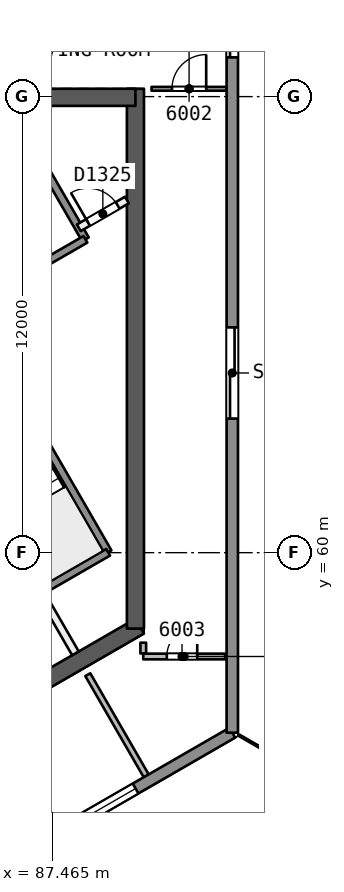
"""IFC4 building model, lengths in metres.
Left out: names, types, materials, properties, quantities, classifications, styles, units other than length and angle.
Written with IfcOpenShell. Run it as: python <this file> out.ifc"""

import sys

from ifc_helpers import new_model, si_unit, direction, frame, frame_2d, origin, origin_2d, place, context, subcontext, project, spatial, rectangle, extrude, element, fill, save


model = new_model("IFC4")
c1 = context("Model", 3, precision=1e-05, world=origin(), true_north=direction((0.0, 1.0)))
c2 = subcontext(c1, "Body", "Model", "MODEL_VIEW")
j1 = project(units=[si_unit("LENGTHUNIT", "METRE"), si_unit("PLANEANGLEUNIT", "RADIAN")], contexts=[c1])
p1 = place(None, origin())
s1 = spatial("IfcSite", under=j1, at=p1, CompositionType="ELEMENT")
p2 = place(p1, origin())
s2 = spatial("IfcBuilding", under=s1, at=p2, CompositionType="ELEMENT")
p3 = place(p2, frame((0.0, 0.0, 242.8)))
s3 = spatial("IfcBuildingStorey", under=s2, at=p3, CompositionType="ELEMENT", Elevation=242.8)
p4 = place(p3, frame((86.723, 56.31, 0.0), z_axis=(0.0, 0.0, 1.0), x_axis=(0.866042179588, 0.49997094233, 0.0)))
e1 = element("IfcWall", 1, at=p4, inside=s3, PredefinedType="SHEAR", context=c2, shape_type="SweptSolid", body=[
    extrude(rectangle(XDim=3.515, YDim=0.45, at=frame_2d((1.758, 0.0))), origin(), (0.0, 0.0, 1.0), 3.7),
])
p5 = place(p3, frame((89.655, 58.002, 0.0), z_axis=(0.0, 0.0, 1.0), x_axis=(0.0, 1.0, 0.0)))
e2 = element("IfcWall", 2, at=p5, inside=s3, PredefinedType="SHEAR", context=c2, shape_type="SweptSolid", body=[
    extrude(rectangle(XDim=14.204, YDim=0.45, at=frame_2d((7.102, 0.0))), origin(), (0.0, 0.0, 1.0), 3.7),
])
p6 = place(p3, frame((89.655, 71.981, 0.0), z_axis=(0.0, 0.0, 1.0), x_axis=(-1.0, 0.0, 0.0)))
e3 = element("IfcWall", 3, at=p6, inside=s3, PredefinedType="SHEAR", context=c2, shape_type="SweptSolid", body=[
    extrude(rectangle(XDim=10.155, YDim=0.45, at=frame_2d((5.078, 0.0))), origin(), (0.0, 0.0, 1.0), 3.7),
])
p7 = place(p6, frame((8.005, 0.0, 0.0)))
e4 = element("IfcOpeningElement", 4, at=p7, cuts=e3, PredefinedType="OPENING", context=c2, shape_type="SweptSolid", body=[
    extrude(rectangle(XDim=1.2, YDim=2.1, at=frame_2d((0.6, 1.05))), frame((0.0, 0.235, 0.0), z_axis=(0.0, -1.0, 0.0), x_axis=(1.0, 0.0, 0.0)), (0.0, 0.0, 1.0), 0.471),
])
p8 = place(p3, frame((91.287, 51.79, 0.0), z_axis=(-0.017607037296, 0.030466109479, 0.999380712447), x_axis=(0.500061328599, -0.865274797998, 0.035187946645)))
e5 = element("IfcColumn", 5, at=p8, inside=s3, PredefinedType="COLUMN", context=c2, shape_type="SweptSolid", body=[
    extrude(rectangle(XDim=1.9, YDim=1.9, at=origin_2d()), origin(), (0.0, 0.0, 1.0), 3.702),
])
p9 = place(p3, frame((90.079, 72.206, 0.0), z_axis=(0.0, 0.0, 1.0), x_axis=(1.0, 0.0, 0.0)))
e6 = element("IfcWall", 6, at=p9, inside=s3, PredefinedType="PARTITIONING", context=c2, shape_type="SweptSolid", body=[
    extrude(rectangle(XDim=1.976, YDim=0.1, at=frame_2d((0.988, 0.0))), origin(), (0.0, 0.0, 1.0), 3.35),
])
p10 = place(p9, frame((0.538, 0.0, 0.0)))
e7 = element("IfcOpeningElement", 7, at=p10, cuts=e6, PredefinedType="OPENING", context=c2, shape_type="SweptSolid", body=[
    extrude(rectangle(XDim=0.9, YDim=2.1, at=frame_2d((0.45, 1.05))), frame((0.0, 0.061, 0.0), z_axis=(0.0, -1.0, 0.0), x_axis=(1.0, 0.0, 0.0)), (0.0, 0.0, 1.0), 0.121),
])
p11 = place(p3, frame((89.861, 57.632, 0.0), z_axis=(0.0, 0.0, 1.0), x_axis=(0.0, -1.0, 0.0)))
e8 = element("IfcWall", 8, at=p11, inside=s3, PredefinedType="PARTITIONING", context=c2, shape_type="SweptSolid", body=[
    extrude(rectangle(XDim=0.284, YDim=0.15, at=frame_2d((0.142, 0.0))), origin(), (0.0, 0.0, 1.0), 3.35),
])
p12 = place(p3, frame((89.861, 57.268, 0.0), z_axis=(0.0, 0.0, 1.0), x_axis=(1.0, 0.0, 0.0)))
e9 = element("IfcWall", 9, at=p12, inside=s3, PredefinedType="PARTITIONING", context=c2, shape_type="SweptSolid", body=[
    extrude(rectangle(XDim=2.153, YDim=0.15, at=frame_2d((1.076, 0.0))), origin(), (0.0, 0.0, 1.0), 3.35),
])
p13 = place(p12, frame((0.62, 0.0, 0.0)))
e10 = element("IfcOpeningElement", 10, at=p13, cuts=e9, PredefinedType="OPENING", context=c2, shape_type="SweptSolid", body=[
    extrude(rectangle(XDim=0.8, YDim=2.1, at=frame_2d((0.4, 1.05))), frame((0.0, 0.085, 0.0), z_axis=(0.0, -1.0, 0.0), x_axis=(1.0, 0.0, 0.0)), (0.0, 0.0, 1.0), 0.171),
])
p14 = place(p3, frame((88.402, 56.789, 0.0), z_axis=(0.0, 0.0, 1.0), x_axis=(0.500008936691, -0.866020244122, 0.0)))
e11 = element("IfcWall", 11, at=p14, inside=s3, PredefinedType="PARTITIONING", context=c2, shape_type="SweptSolid", body=[
    extrude(rectangle(XDim=3.074, YDim=0.15, at=frame_2d((1.537, 0.0))), origin(), (0.0, 0.0, 1.0), 3.35),
])
p15 = place(p3, frame((92.204, 55.263, 0.0), z_axis=(0.0, 0.0, 1.0), x_axis=(-0.866028941823, -0.499993871887, 0.0)))
e12 = element("IfcWall", 12, at=p15, inside=s3, PredefinedType="SOLIDWALL", context=c2, shape_type="SweptSolid", body=[
    extrude(rectangle(XDim=5.061, YDim=0.3, at=frame_2d((2.531, 0.0))), origin(), (0.0, 0.0, 1.0), 3.35),
])
p16 = place(p15, frame((2.938, 0.0, 0.9)))
e13 = element("IfcOpeningElement", 13, at=p16, cuts=e12, PredefinedType="OPENING", context=c2, shape_type="SweptSolid", body=[
    extrude(rectangle(XDim=1.8, YDim=1.5, at=frame_2d((0.9, 0.75))), frame((0.0, 0.161, 0.0), z_axis=(0.0, -1.0, 0.0), x_axis=(1.0, 0.0, 0.0)), (0.0, 0.0, 1.0), 0.321),
])
p17 = place(p3, frame((92.204, 104.737, 0.0), z_axis=(0.0, 0.0, 1.0), x_axis=(0.0, -1.0, 0.0)))
e14 = element("IfcWall", 14, at=p17, inside=s3, PredefinedType="SOLIDWALL", context=c2, shape_type="SweptSolid", body=[
    extrude(rectangle(XDim=49.474, YDim=0.3, at=frame_2d((24.737, 0.0))), origin(), (0.0, 0.0, 1.0), 3.35),
])
p18 = place(p17, frame((29.304, 0.0, 0.0)))
e15 = element("IfcOpeningElement", 15, at=p18, cuts=e14, PredefinedType="OPENING", context=c2, shape_type="SweptSolid", body=[
    extrude(rectangle(XDim=2.4, YDim=2.4, at=frame_2d((1.2, 1.2))), frame((0.0, 0.161, 0.0), z_axis=(0.0, -1.0, 0.0), x_axis=(1.0, 0.0, 0.0)), (0.0, 0.0, 1.0), 0.321),
])
p19 = place(p17, frame((38.809, 0.0, 0.0)))
e16 = element("IfcOpeningElement", 16, at=p19, cuts=e14, PredefinedType="OPENING", context=c2, shape_type="SweptSolid", body=[
    extrude(rectangle(XDim=2.4, YDim=2.4, at=frame_2d((1.2, 1.2))), frame((0.0, 0.161, 0.0), z_axis=(0.0, -1.0, 0.0), x_axis=(1.0, 0.0, 0.0)), (0.0, 0.0, 1.0), 0.321),
])
p20 = place(p17, frame((17.925, 0.0, 0.0)))
e17 = element("IfcOpeningElement", 17, at=p20, cuts=e14, PredefinedType="OPENING", context=c2, shape_type="SweptSolid", body=[
    extrude(rectangle(XDim=2.4, YDim=2.4, at=frame_2d((1.2, 1.2))), frame((0.0, 0.161, 0.0), z_axis=(0.0, -1.0, 0.0), x_axis=(1.0, 0.0, 0.0)), (0.0, 0.0, 1.0), 0.321),
])
p21 = place(p17, frame((8.234, 0.0, 0.0)))
e18 = element("IfcOpeningElement", 18, at=p21, cuts=e14, PredefinedType="OPENING", context=c2, shape_type="SweptSolid", body=[
    extrude(rectangle(XDim=2.4, YDim=2.4, at=frame_2d((1.2, 1.2))), frame((0.0, 0.161, 0.0), z_axis=(0.0, -1.0, 0.0), x_axis=(1.0, 0.0, 0.0)), (0.0, 0.0, 1.0), 0.321),
])
p22 = place(p17, frame((25.785, 0.0, 0.9)))
e19 = element("IfcOpeningElement", 19, at=p22, cuts=e14, PredefinedType="OPENING", context=c2, shape_type="SweptSolid", body=[
    extrude(rectangle(XDim=1.8, YDim=1.5, at=frame_2d((0.9, 0.75))), frame((0.0, 0.161, 0.0), z_axis=(0.0, -1.0, 0.0), x_axis=(1.0, 0.0, 0.0)), (0.0, 0.0, 1.0), 0.321),
])
p23 = place(p17, frame((22.2, 0.0, 0.9)))
e20 = element("IfcOpeningElement", 20, at=p23, cuts=e14, PredefinedType="OPENING", context=c2, shape_type="SweptSolid", body=[
    extrude(rectangle(XDim=1.8, YDim=1.5, at=frame_2d((0.9, 0.75))), frame((0.0, 0.161, 0.0), z_axis=(0.0, -1.0, 0.0), x_axis=(1.0, 0.0, 0.0)), (0.0, 0.0, 1.0), 0.321),
])
p24 = place(p3, frame((87.821, 52.733, 0.0), z_axis=(0.0, 0.0, 1.0), x_axis=(-0.866025586464, 0.49999968359, 0.0)))
e21 = element("IfcWall", 21, at=p24, inside=s3, PredefinedType="SOLIDWALL", context=c2, shape_type="SweptSolid", body=[
    extrude(rectangle(XDim=49.474, YDim=0.3, at=frame_2d((24.737, 0.0))), origin(), (0.0, 0.0, 1.0), 3.35),
])
p25 = place(p24, frame((23.849, 0.0, 0.0)))
e22 = element("IfcOpeningElement", 22, at=p25, cuts=e21, PredefinedType="OPENING", context=c2, shape_type="SweptSolid", body=[
    extrude(rectangle(XDim=2.4, YDim=2.4, at=frame_2d((1.2, 1.2))), frame((0.0, 0.161, 0.0), z_axis=(0.0, -1.0, 0.0), x_axis=(1.0, 0.0, 0.0)), (0.0, 0.0, 1.0), 0.321),
])
p26 = place(p24, frame((37.196, 0.0, 0.0)))
e23 = element("IfcOpeningElement", 23, at=p26, cuts=e21, PredefinedType="OPENING", context=c2, shape_type="SweptSolid", body=[
    extrude(rectangle(XDim=2.4, YDim=2.4, at=frame_2d((1.2, 1.2))), frame((0.0, 0.161, 0.0), z_axis=(0.0, -1.0, 0.0), x_axis=(1.0, 0.0, 0.0)), (0.0, 0.0, 1.0), 0.321),
])
p27 = place(p24, frame((10.19, 0.0, 0.0)))
e24 = element("IfcOpeningElement", 24, at=p27, cuts=e21, PredefinedType="OPENING", context=c2, shape_type="SweptSolid", body=[
    extrude(rectangle(XDim=2.4, YDim=2.4, at=frame_2d((1.2, 1.2))), frame((0.0, 0.161, 0.0), z_axis=(0.0, -1.0, 0.0), x_axis=(1.0, 0.0, 0.0)), (0.0, 0.0, 1.0), 0.321),
])
p28 = place(p3, frame((87.09, 59.06, 0.0), z_axis=(0.0, 0.0, 1.0), x_axis=(0.500011643316, -0.866018681408, 0.0)))
e25 = element("IfcWall", 25, at=p28, inside=s3, PredefinedType="PARTITIONING", context=c2, shape_type="SweptSolid", body=[
    extrude(rectangle(XDim=1.973, YDim=0.2, at=frame_2d((0.987, 0.0))), origin(), (0.0, 0.0, 1.0), 3.35),
])
p29 = place(p3, frame((85.087, 66.679, 0.0), z_axis=(0.0, 0.0, 1.0), x_axis=(0.500019787375, -0.866013979237, 0.0)))
e26 = element("IfcWall", 26, at=p29, inside=s3, PredefinedType="SOLIDWALL", context=c2, shape_type="SweptSolid", body=[
    extrude(rectangle(XDim=7.7, YDim=0.2, at=frame_2d((3.85, 0.0))), origin(), (0.0, 0.0, 1.0), 3.35),
])
p30 = place(p29, frame((0.55, 0.0, 0.0)))
e27 = element("IfcOpeningElement", 27, at=p30, cuts=e26, PredefinedType="OPENING", context=c2, shape_type="SweptSolid", body=[
    extrude(rectangle(XDim=1.1, YDim=2.1, at=frame_2d((0.55, 1.05))), frame((0.0, 0.11, 0.0), z_axis=(0.0, -1.0, 0.0), x_axis=(1.0, 0.0, 0.0)), (0.0, 0.0, 1.0), 0.221),
])
p31 = place(p3, frame((86.965, 70.626, 0.0), z_axis=(0.0, 0.0, 1.0), x_axis=(0.499996545922, -0.866027397988, 0.0)))
e28 = element("IfcWall", 28, at=p31, inside=s3, PredefinedType="SOLIDWALL", context=c2, shape_type="SweptSolid", body=[
    extrude(rectangle(XDim=2.75, YDim=0.2, at=frame_2d((1.375, 0.0))), origin(), (0.0, 0.0, 1.0), 3.35),
])
p32 = place(p3, frame((88.165, 68.548, 0.0), z_axis=(0.0, 0.0, 1.0), x_axis=(0.866013036001, 0.500021421018, 0.0)))
e29 = element("IfcWall", 29, at=p32, inside=s3, PredefinedType="PARTITIONING", context=c2, shape_type="SweptSolid", body=[
    extrude(rectangle(XDim=1.461, YDim=0.2, at=frame_2d((0.73, 0.0))), origin(), (0.0, 0.0, 1.0), 3.35),
])
p33 = place(p32, frame((0.281, 0.0, 0.0)))
e30 = element("IfcOpeningElement", 30, at=p33, cuts=e29, PredefinedType="OPENING", context=c2, shape_type="SweptSolid", body=[
    extrude(rectangle(XDim=0.9, YDim=2.1, at=frame_2d((0.45, 1.05))), frame((0.0, 0.11, 0.0), z_axis=(0.0, -1.0, 0.0), x_axis=(1.0, 0.0, 0.0)), (0.0, 0.0, 1.0), 0.221),
])
p34 = place(p3, frame((86.348, 67.095, 0.0), z_axis=(0.0, 0.0, 1.0), x_axis=(0.86602648383, 0.499998129301, 0.0)))
e31 = element("IfcWall", 31, at=p34, inside=s3, PredefinedType="SOLIDWALL", context=c2, shape_type="SweptSolid", body=[
    extrude(rectangle(XDim=2.3, YDim=0.2, at=frame_2d((1.15, 0.0))), origin(), (0.0, 0.0, 1.0), 3.35),
])
p35 = place(p3, frame((85.343, 57.935, 0.0), z_axis=(0.0, 0.0, 1.0), x_axis=(0.866004344652, 0.500036473714, 0.0)))
e32 = element("IfcWall", 32, at=p35, inside=s3, PredefinedType="SOLIDWALL", context=c2, shape_type="SweptSolid", body=[
    extrude(rectangle(XDim=4.15, YDim=0.2, at=frame_2d((2.075, 0.0))), origin(), (0.0, 0.0, 1.0), 3.35),
])
p36 = place(p10, origin())
e33 = element("IfcDoor", 33, at=p36, inside=s3, OperationType="SINGLE_SWING_RIGHT", PredefinedType="NOTDEFINED", context=c2, shape_type="SweptSolid", body=[
    extrude(rectangle(XDim=0.9, YDim=2.1, at=frame_2d((0.45, 1.05))), frame((0.0, 0.025, 0.0), z_axis=(0.0, -1.0, 0.0), x_axis=(1.0, 0.0, 0.0)), (0.0, 0.0, 1.0), 0.05),
])
fill(e7, e33)
p37 = place(p13, origin())
e34 = element("IfcDoor", 34, at=p37, inside=s3, OperationType="SINGLE_SWING_RIGHT", PredefinedType="NOTDEFINED", context=c2, shape_type="SweptSolid", body=[
    extrude(rectangle(XDim=0.8, YDim=2.1, at=frame_2d((0.4, 1.05))), frame((0.0, 0.025, 0.0), z_axis=(0.0, -1.0, 0.0), x_axis=(1.0, 0.0, 0.0)), (0.0, 0.0, 1.0), 0.05),
])
fill(e10, e34)
p38 = place(p16, origin())
e35 = element("IfcWindow", 35, at=p38, inside=s3, PartitioningType="SINGLE_PANEL", PredefinedType="WINDOW", context=c2, shape_type="SweptSolid", body=[
    extrude(rectangle(XDim=1.8, YDim=1.5, at=frame_2d((0.9, 0.75))), frame((0.0, 0.03, 0.0), z_axis=(0.0, -1.0, 0.0), x_axis=(1.0, 0.0, 0.0)), (0.0, 0.0, 1.0), 0.06),
])
fill(e13, e35)
p39 = place(p18, origin())
e36 = element("IfcDoor", 36, at=p39, inside=s3, OperationType="SLIDING_TO_LEFT", PredefinedType="NOTDEFINED", context=c2, shape_type="SweptSolid", body=[
    extrude(rectangle(XDim=2.4, YDim=2.4, at=frame_2d((1.2, 1.2))), frame((0.0, 0.025, 0.0), z_axis=(0.0, -1.0, 0.0), x_axis=(1.0, 0.0, 0.0)), (0.0, 0.0, 1.0), 0.05),
])
fill(e15, e36)
p40 = place(p19, origin())
e37 = element("IfcDoor", 37, at=p40, inside=s3, OperationType="SLIDING_TO_RIGHT", PredefinedType="NOTDEFINED", context=c2, shape_type="SweptSolid", body=[
    extrude(rectangle(XDim=2.4, YDim=2.4, at=frame_2d((1.2, 1.2))), frame((0.0, 0.025, 0.0), z_axis=(0.0, -1.0, 0.0), x_axis=(1.0, 0.0, 0.0)), (0.0, 0.0, 1.0), 0.05),
])
fill(e16, e37)
p41 = place(p33, origin())
e38 = element("IfcDoor", 38, at=p41, inside=s3, OperationType="SINGLE_SWING_LEFT", PredefinedType="NOTDEFINED", context=c2, shape_type="SweptSolid", body=[
    extrude(rectangle(XDim=0.9, YDim=2.1, at=frame_2d((0.45, 1.05))), frame((0.0, 0.025, 0.0), z_axis=(0.0, -1.0, 0.0), x_axis=(1.0, 0.0, 0.0)), (0.0, 0.0, 1.0), 0.05),
])
fill(e30, e38)
save(model, sys.argv[1])
